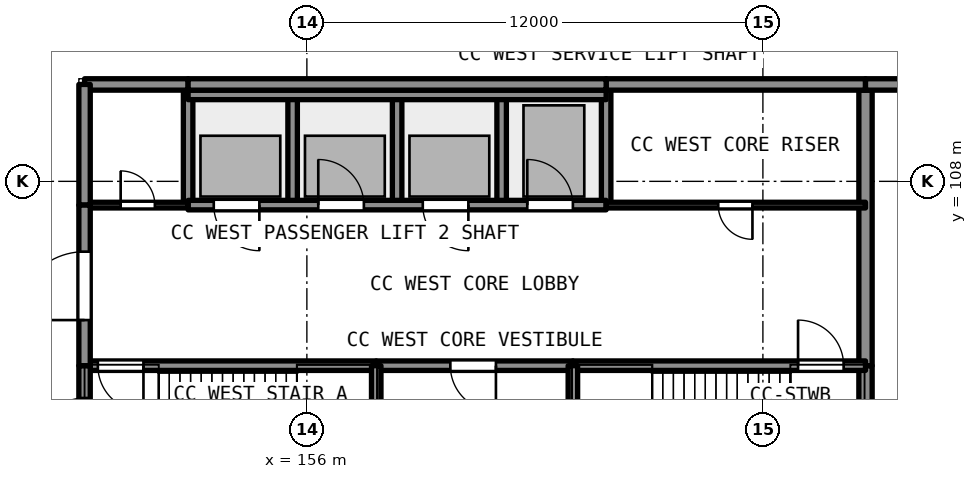
"""IFC4 building model, lengths in metres.
Left out: names, types, materials, properties, quantities, classifications, styles, units other than length and angle.
Written with IfcOpenShell. Run it as: python <this file> out.ifc"""

import sys

from ifc_helpers import new_model, si_unit, direction, frame, frame_2d, origin, place, context, subcontext, project, spatial, rectangle, extrude, element, fill, save


model = new_model("IFC4")
c1 = context("Model", 3, precision=1e-05, world=origin(), true_north=direction((0.0, 1.0)))
c2 = subcontext(c1, "Body", "Model", "MODEL_VIEW")
j1 = project(units=[si_unit("LENGTHUNIT", "METRE"), si_unit("PLANEANGLEUNIT", "RADIAN")], contexts=[c1])
p1 = place(None, origin())
s1 = spatial("IfcSite", under=j1, at=p1, CompositionType="ELEMENT")
p2 = place(p1, origin())
s2 = spatial("IfcBuilding", under=s1, at=p2, CompositionType="ELEMENT")
p3 = place(p2, origin())
s3 = spatial("IfcBuildingStorey", under=s2, at=p3, CompositionType="ELEMENT", Elevation=0.0)
p4 = place(p3, frame((170.7, 100.0, 0.0), z_axis=(0.0, 0.0, 1.0), x_axis=(0.0, 1.0, 0.0)))
e1 = element("IfcWall", 1, at=p4, inside=s3, PredefinedType="SHEAR", context=c2, shape_type="SweptSolid", body=[
    extrude(rectangle(XDim=3.15, YDim=0.35, at=frame_2d((1.575, 0.0))), origin(), (0.0, 0.0, 1.0), 8.59),
])
p5 = place(p3, frame((170.7, 103.15, 0.0), z_axis=(0.0, 0.0, 1.0), x_axis=(0.0, 1.0, 0.0)))
e2 = element("IfcWall", 2, at=p5, inside=s3, PredefinedType="SHEAR", context=c2, shape_type="SweptSolid", body=[
    extrude(rectangle(XDim=7.25, YDim=0.35, at=frame_2d((3.625, 0.0))), origin(), (0.0, 0.0, 1.0), 8.59),
])
p6 = place(p3, frame((150.3, 103.15, 0.0), z_axis=(0.0, 0.0, 1.0), x_axis=(1.0, 0.0, 0.0)))
e3 = element("IfcWall", 3, at=p6, inside=s3, PredefinedType="SHEAR", context=c2, shape_type="SweptSolid", body=[
    extrude(rectangle(XDim=7.525, YDim=0.25, at=frame_2d((3.762, 0.0))), origin(), (0.0, 0.0, 1.0), 8.59),
])
p7 = place(p6, frame((0.2, 0.0, 0.0)))
e4 = element("IfcOpeningElement", 4, at=p7, cuts=e3, PredefinedType="OPENING", context=c2, shape_type="SweptSolid", body=[
    extrude(rectangle(XDim=1.2, YDim=2.1, at=frame_2d((0.6, 1.05))), frame((0.0, 0.135, 0.0), z_axis=(0.0, -1.0, 0.0), x_axis=(1.0, 0.0, 0.0)), (0.0, 0.0, 1.0), 0.271),
])
p8 = place(p3, frame((157.825, 103.15, 0.0), z_axis=(0.0, 0.0, 1.0), x_axis=(1.0, 0.0, 0.0)))
e5 = element("IfcWall", 5, at=p8, inside=s3, PredefinedType="SHEAR", context=c2, shape_type="SweptSolid", body=[
    extrude(rectangle(XDim=5.175, YDim=0.25, at=frame_2d((2.587, 0.0))), origin(), (0.0, 0.0, 1.0), 8.59),
])
p9 = place(p8, frame((1.95, 0.0, 0.0)))
e6 = element("IfcOpeningElement", 6, at=p9, cuts=e5, PredefinedType="OPENING", context=c2, shape_type="SweptSolid", body=[
    extrude(rectangle(XDim=1.2, YDim=2.1, at=frame_2d((0.6, 1.05))), frame((0.0, 0.135, 0.0), z_axis=(0.0, -1.0, 0.0), x_axis=(1.0, 0.0, 0.0)), (0.0, 0.0, 1.0), 0.271),
])
p10 = place(p3, frame((163.0, 103.15, 0.0), z_axis=(0.0, 0.0, 1.0), x_axis=(1.0, 0.0, 0.0)))
e7 = element("IfcWall", 7, at=p10, inside=s3, PredefinedType="SHEAR", context=c2, shape_type="SweptSolid", body=[
    extrude(rectangle(XDim=7.7, YDim=0.25, at=frame_2d((3.85, 0.0))), origin(), (0.0, 0.0, 1.0), 8.59),
])
p11 = place(p10, frame((5.925, 0.0, 0.0)))
e8 = element("IfcOpeningElement", 8, at=p11, cuts=e7, PredefinedType="OPENING", context=c2, shape_type="SweptSolid", body=[
    extrude(rectangle(XDim=1.2, YDim=2.1, at=frame_2d((0.6, 1.05))), frame((0.0, 0.135, 0.0), z_axis=(0.0, -1.0, 0.0), x_axis=(1.0, 0.0, 0.0)), (0.0, 0.0, 1.0), 0.271),
])
for number, where, z_axis, x_axis in (
    (9, (157.825, 100.0, 0.0), (0.0, 0.0, 1.0), (0.0, 1.0, 0.0)),
    (10, (163.0, 100.0, 0.0), (0.0, 0.0, 1.0), (0.0, 1.0, 0.0)),
):
    element("IfcWall", number, at=place(p3, frame(where, z_axis=z_axis, x_axis=x_axis)), inside=s3, PredefinedType="SHEAR", context=c2, shape_type="SweptSolid", body=[
        extrude(rectangle(XDim=3.15, YDim=0.25, at=frame_2d((1.575, 0.0))), origin(), (0.0, 0.0, 1.0), 8.59),
    ])
for number, where, z_axis, x_axis in (
    (11, (152.875, 107.375, -1.2), (0.0, 0.0, 1.0), (0.0, 1.0, 0.0)),
    (12, (155.625, 107.375, -1.2), (0.0, 0.0, 1.0), (0.0, 1.0, 0.0)),
    (13, (158.375, 107.375, -1.2), (0.0, 0.0, 1.0), (0.0, 1.0, 0.0)),
    (14, (161.125, 107.375, -1.2), (0.0, 0.0, 1.0), (0.0, 1.0, 0.0)),
    (15, (163.875, 107.375, -1.2), (0.0, 0.0, 1.0), (0.0, 1.0, 0.0)),
):
    element("IfcWall", number, at=place(p3, frame(where, z_axis=z_axis, x_axis=x_axis)), inside=s3, PredefinedType="SHEAR", context=c2, shape_type="SweptSolid", body=[
        extrude(rectangle(XDim=3.025, YDim=0.25, at=frame_2d((1.512, 0.0))), origin(), (0.0, 0.0, 1.0), 30.79),
    ])
p12 = place(p3, frame((163.875, 107.375, -1.2), z_axis=(0.0, 0.0, 1.0), x_axis=(-1.0, 0.0, 0.0)))
e16 = element("IfcWall", 16, at=p12, inside=s3, PredefinedType="SHEAR", context=c2, shape_type="SweptSolid", body=[
    extrude(rectangle(XDim=11.0, YDim=0.25, at=frame_2d((5.5, 0.0))), origin(), (0.0, 0.0, 1.0), 30.79),
])
p13 = place(p12, frame((9.125, 0.0, 1.2)))
e17 = element("IfcOpeningElement", 17, at=p13, cuts=e16, PredefinedType="OPENING", context=c2, shape_type="SweptSolid", body=[
    extrude(rectangle(XDim=1.2, YDim=2.1, at=frame_2d((0.6, 1.05))), frame((0.0, 0.135, 0.0), z_axis=(0.0, -1.0, 0.0), x_axis=(1.0, 0.0, 0.0)), (0.0, 0.0, 1.0), 0.271),
])
p14 = place(p12, frame((6.375, 0.0, 1.2)))
e18 = element("IfcOpeningElement", 18, at=p14, cuts=e16, PredefinedType="OPENING", context=c2, shape_type="SweptSolid", body=[
    extrude(rectangle(XDim=1.2, YDim=2.1, at=frame_2d((0.6, 1.05))), frame((0.0, 0.135, 0.0), z_axis=(0.0, -1.0, 0.0), x_axis=(1.0, 0.0, 0.0)), (0.0, 0.0, 1.0), 0.271),
])
p15 = place(p12, frame((3.625, 0.0, 1.2)))
e19 = element("IfcOpeningElement", 19, at=p15, cuts=e16, PredefinedType="OPENING", context=c2, shape_type="SweptSolid", body=[
    extrude(rectangle(XDim=1.2, YDim=2.1, at=frame_2d((0.6, 1.05))), frame((0.0, 0.135, 0.0), z_axis=(0.0, -1.0, 0.0), x_axis=(1.0, 0.0, 0.0)), (0.0, 0.0, 1.0), 0.271),
])
p16 = place(p12, frame((0.875, 0.0, 1.2)))
e20 = element("IfcOpeningElement", 20, at=p16, cuts=e16, PredefinedType="OPENING", context=c2, shape_type="SweptSolid", body=[
    extrude(rectangle(XDim=1.2, YDim=2.1, at=frame_2d((0.6, 1.05))), frame((0.0, 0.135, 0.0), z_axis=(0.0, -1.0, 0.0), x_axis=(1.0, 0.0, 0.0)), (0.0, 0.0, 1.0), 0.271),
])
p17 = place(p12, frame((9.125, 0.0, 10.2)))
e21 = element("IfcOpeningElement", 21, at=p17, cuts=e16, PredefinedType="OPENING", context=c2, shape_type="SweptSolid", body=[
    extrude(rectangle(XDim=1.2, YDim=2.1, at=frame_2d((0.6, 1.05))), frame((0.0, 0.135, 0.0), z_axis=(0.0, -1.0, 0.0), x_axis=(1.0, 0.0, 0.0)), (0.0, 0.0, 1.0), 0.271),
])
p18 = place(p12, frame((6.375, 0.0, 10.2)))
e22 = element("IfcOpeningElement", 22, at=p18, cuts=e16, PredefinedType="OPENING", context=c2, shape_type="SweptSolid", body=[
    extrude(rectangle(XDim=1.2, YDim=2.1, at=frame_2d((0.6, 1.05))), frame((0.0, 0.135, 0.0), z_axis=(0.0, -1.0, 0.0), x_axis=(1.0, 0.0, 0.0)), (0.0, 0.0, 1.0), 0.271),
])
p19 = place(p12, frame((3.625, 0.0, 10.2)))
e23 = element("IfcOpeningElement", 23, at=p19, cuts=e16, PredefinedType="OPENING", context=c2, shape_type="SweptSolid", body=[
    extrude(rectangle(XDim=1.2, YDim=2.1, at=frame_2d((0.6, 1.05))), frame((0.0, 0.135, 0.0), z_axis=(0.0, -1.0, 0.0), x_axis=(1.0, 0.0, 0.0)), (0.0, 0.0, 1.0), 0.271),
])
p20 = place(p12, frame((0.875, 0.0, 10.2)))
e24 = element("IfcOpeningElement", 24, at=p20, cuts=e16, PredefinedType="OPENING", context=c2, shape_type="SweptSolid", body=[
    extrude(rectangle(XDim=1.2, YDim=2.1, at=frame_2d((0.6, 1.05))), frame((0.0, 0.135, 0.0), z_axis=(0.0, -1.0, 0.0), x_axis=(1.0, 0.0, 0.0)), (0.0, 0.0, 1.0), 0.271),
])
p21 = place(p12, frame((9.125, 0.0, 16.2)))
e25 = element("IfcOpeningElement", 25, at=p21, cuts=e16, PredefinedType="OPENING", context=c2, shape_type="SweptSolid", body=[
    extrude(rectangle(XDim=1.2, YDim=2.1, at=frame_2d((0.6, 1.05))), frame((0.0, 0.135, 0.0), z_axis=(0.0, -1.0, 0.0), x_axis=(1.0, 0.0, 0.0)), (0.0, 0.0, 1.0), 0.271),
])
p22 = place(p12, frame((6.375, 0.0, 16.2)))
e26 = element("IfcOpeningElement", 26, at=p22, cuts=e16, PredefinedType="OPENING", context=c2, shape_type="SweptSolid", body=[
    extrude(rectangle(XDim=1.2, YDim=2.1, at=frame_2d((0.6, 1.05))), frame((0.0, 0.135, 0.0), z_axis=(0.0, -1.0, 0.0), x_axis=(1.0, 0.0, 0.0)), (0.0, 0.0, 1.0), 0.271),
])
p23 = place(p12, frame((3.625, 0.0, 16.2)))
e27 = element("IfcOpeningElement", 27, at=p23, cuts=e16, PredefinedType="OPENING", context=c2, shape_type="SweptSolid", body=[
    extrude(rectangle(XDim=1.2, YDim=2.1, at=frame_2d((0.6, 1.05))), frame((0.0, 0.135, 0.0), z_axis=(0.0, -1.0, 0.0), x_axis=(1.0, 0.0, 0.0)), (0.0, 0.0, 1.0), 0.271),
])
p24 = place(p12, frame((0.875, 0.0, 16.2)))
e28 = element("IfcOpeningElement", 28, at=p24, cuts=e16, PredefinedType="OPENING", context=c2, shape_type="SweptSolid", body=[
    extrude(rectangle(XDim=1.2, YDim=2.1, at=frame_2d((0.6, 1.05))), frame((0.0, 0.135, 0.0), z_axis=(0.0, -1.0, 0.0), x_axis=(1.0, 0.0, 0.0)), (0.0, 0.0, 1.0), 0.271),
])
p25 = place(p12, frame((9.125, 0.0, 21.6)))
e29 = element("IfcOpeningElement", 29, at=p25, cuts=e16, PredefinedType="OPENING", context=c2, shape_type="SweptSolid", body=[
    extrude(rectangle(XDim=1.2, YDim=2.1, at=frame_2d((0.6, 1.05))), frame((0.0, 0.135, 0.0), z_axis=(0.0, -1.0, 0.0), x_axis=(1.0, 0.0, 0.0)), (0.0, 0.0, 1.0), 0.271),
])
p26 = place(p12, frame((6.375, 0.0, 21.6)))
e30 = element("IfcOpeningElement", 30, at=p26, cuts=e16, PredefinedType="OPENING", context=c2, shape_type="SweptSolid", body=[
    extrude(rectangle(XDim=1.2, YDim=2.1, at=frame_2d((0.6, 1.05))), frame((0.0, 0.135, 0.0), z_axis=(0.0, -1.0, 0.0), x_axis=(1.0, 0.0, 0.0)), (0.0, 0.0, 1.0), 0.271),
])
p27 = place(p12, frame((3.625, 0.0, 21.6)))
e31 = element("IfcOpeningElement", 31, at=p27, cuts=e16, PredefinedType="OPENING", context=c2, shape_type="SweptSolid", body=[
    extrude(rectangle(XDim=1.2, YDim=2.1, at=frame_2d((0.6, 1.05))), frame((0.0, 0.135, 0.0), z_axis=(0.0, -1.0, 0.0), x_axis=(1.0, 0.0, 0.0)), (0.0, 0.0, 1.0), 0.271),
])
p28 = place(p12, frame((0.875, 0.0, 21.6)))
e32 = element("IfcOpeningElement", 32, at=p28, cuts=e16, PredefinedType="OPENING", context=c2, shape_type="SweptSolid", body=[
    extrude(rectangle(XDim=1.2, YDim=2.1, at=frame_2d((0.6, 1.05))), frame((0.0, 0.135, 0.0), z_axis=(0.0, -1.0, 0.0), x_axis=(1.0, 0.0, 0.0)), (0.0, 0.0, 1.0), 0.271),
])
p29 = place(p12, frame((9.125, 0.0, 26.6)))
e33 = element("IfcOpeningElement", 33, at=p29, cuts=e16, PredefinedType="OPENING", context=c2, shape_type="SweptSolid", body=[
    extrude(rectangle(XDim=1.2, YDim=2.1, at=frame_2d((0.6, 1.05))), frame((0.0, 0.135, 0.0), z_axis=(0.0, -1.0, 0.0), x_axis=(1.0, 0.0, 0.0)), (0.0, 0.0, 1.0), 0.271),
])
p30 = place(p12, frame((6.375, 0.0, 26.6)))
e34 = element("IfcOpeningElement", 34, at=p30, cuts=e16, PredefinedType="OPENING", context=c2, shape_type="SweptSolid", body=[
    extrude(rectangle(XDim=1.2, YDim=2.1, at=frame_2d((0.6, 1.05))), frame((0.0, 0.135, 0.0), z_axis=(0.0, -1.0, 0.0), x_axis=(1.0, 0.0, 0.0)), (0.0, 0.0, 1.0), 0.271),
])
p31 = place(p12, frame((3.625, 0.0, 26.6)))
e35 = element("IfcOpeningElement", 35, at=p31, cuts=e16, PredefinedType="OPENING", context=c2, shape_type="SweptSolid", body=[
    extrude(rectangle(XDim=1.2, YDim=2.1, at=frame_2d((0.6, 1.05))), frame((0.0, 0.135, 0.0), z_axis=(0.0, -1.0, 0.0), x_axis=(1.0, 0.0, 0.0)), (0.0, 0.0, 1.0), 0.271),
])
p32 = place(p12, frame((0.875, 0.0, 26.6)))
e36 = element("IfcOpeningElement", 36, at=p32, cuts=e16, PredefinedType="OPENING", context=c2, shape_type="SweptSolid", body=[
    extrude(rectangle(XDim=1.2, YDim=2.1, at=frame_2d((0.6, 1.05))), frame((0.0, 0.135, 0.0), z_axis=(0.0, -1.0, 0.0), x_axis=(1.0, 0.0, 0.0)), (0.0, 0.0, 1.0), 0.271),
])
p33 = place(p3, frame((152.875, 110.275, -1.2), z_axis=(0.0, 0.0, 1.0), x_axis=(1.0, 0.0, 0.0)))
e37 = element("IfcWall", 37, at=p33, inside=s3, PredefinedType="SHEAR", context=c2, shape_type="SweptSolid", body=[
    extrude(rectangle(XDim=11.0, YDim=0.25, at=frame_2d((5.5, 0.0))), origin(), (0.0, 0.0, 1.0), 30.79),
])
p34 = place(p3, frame((150.3, 107.375, 0.0), z_axis=(0.0, 0.0, 1.0), x_axis=(1.0, 0.0, 0.0)))
e38 = element("IfcWall", 38, at=p34, inside=s3, PredefinedType="PARTITIONING", context=c2, shape_type="SweptSolid", body=[
    extrude(rectangle(XDim=2.575, YDim=0.15, at=frame_2d((1.288, 0.0))), origin(), (0.0, 0.0, 1.0), 8.59),
])
p35 = place(p34, frame((0.8, 0.0, 0.0)))
e39 = element("IfcOpeningElement", 39, at=p35, cuts=e38, PredefinedType="OPENING", context=c2, shape_type="SweptSolid", body=[
    extrude(rectangle(XDim=0.9, YDim=2.1, at=frame_2d((0.45, 1.05))), frame((0.0, 0.085, 0.0), z_axis=(0.0, -1.0, 0.0), x_axis=(1.0, 0.0, 0.0)), (0.0, 0.0, 1.0), 0.171),
])
p36 = place(p3, frame((150.15, 110.55, 0.0), z_axis=(0.0, 0.0, 1.0), x_axis=(1.0, 0.0, 0.0)))
e40 = element("IfcWall", 40, at=p36, inside=s3, PredefinedType="SOLIDWALL", context=c2, shape_type="SweptSolid", body=[
    extrude(rectangle(XDim=2.725, YDim=0.3, at=frame_2d((1.363, 0.0))), origin(), (0.0, 0.0, 1.0), 8.59),
])
p37 = place(p3, frame((150.15, 107.375, 0.0), z_axis=(0.0, 0.0, 1.0), x_axis=(0.0, 1.0, 0.0)))
e41 = element("IfcWall", 41, at=p37, inside=s3, PredefinedType="SOLIDWALL", context=c2, shape_type="SweptSolid", body=[
    extrude(rectangle(XDim=3.175, YDim=0.3, at=frame_2d((1.587, 0.0))), origin(), (0.0, 0.0, 1.0), 8.59),
])
p38 = place(p3, frame((163.875, 107.375, 0.0), z_axis=(0.0, 0.0, 1.0), x_axis=(1.0, 0.0, 0.0)))
e42 = element("IfcWall", 42, at=p38, inside=s3, PredefinedType="PARTITIONING", context=c2, shape_type="SweptSolid", body=[
    extrude(rectangle(XDim=6.825, YDim=0.15, at=frame_2d((3.413, 0.0))), origin(), (0.0, 0.0, 1.0), 8.59),
])
p39 = place(p38, frame((2.95, 0.0, 0.0)))
e43 = element("IfcOpeningElement", 43, at=p39, cuts=e42, PredefinedType="OPENING", context=c2, shape_type="SweptSolid", body=[
    extrude(rectangle(XDim=0.9, YDim=2.1, at=frame_2d((0.45, 1.05))), frame((0.0, 0.085, 0.0), z_axis=(0.0, -1.0, 0.0), x_axis=(1.0, 0.0, 0.0)), (0.0, 0.0, 1.0), 0.171),
])
p40 = place(p3, frame((163.875, 110.55, 0.0), z_axis=(0.0, 0.0, 1.0), x_axis=(1.0, 0.0, 0.0)))
e44 = element("IfcWall", 44, at=p40, inside=s3, PredefinedType="SOLIDWALL", context=c2, shape_type="SweptSolid", body=[
    extrude(rectangle(XDim=6.825, YDim=0.3, at=frame_2d((3.413, 0.0))), origin(), (0.0, 0.0, 1.0), 8.59),
])
p41 = place(p3, frame((150.15, 100.0, 0.0), z_axis=(0.0, 0.0, 1.0), x_axis=(0.0, 1.0, 0.0)))
e45 = element("IfcWall", 45, at=p41, inside=s3, PredefinedType="SOLIDWALL", context=c2, shape_type="SweptSolid", body=[
    extrude(rectangle(XDim=3.15, YDim=0.3, at=frame_2d((1.575, 0.0))), origin(), (0.0, 0.0, 1.0), 8.59),
])
p42 = place(p41, frame((1.1, 0.0, 0.0)))
e46 = element("IfcOpeningElement", 46, at=p42, cuts=e45, PredefinedType="OPENING", context=c2, shape_type="SweptSolid", body=[
    extrude(rectangle(XDim=1.2, YDim=2.1, at=frame_2d((0.6, 1.05))), frame((0.0, 0.161, 0.0), z_axis=(0.0, -1.0, 0.0), x_axis=(1.0, 0.0, 0.0)), (0.0, 0.0, 1.0), 0.321),
])
p43 = place(p3, frame((150.15, 103.15, 0.0), z_axis=(0.0, 0.0, 1.0), x_axis=(0.0, 1.0, 0.0)))
e47 = element("IfcWall", 47, at=p43, inside=s3, PredefinedType="SOLIDWALL", context=c2, shape_type="SweptSolid", body=[
    extrude(rectangle(XDim=4.225, YDim=0.3, at=frame_2d((2.113, 0.0))), origin(), (0.0, 0.0, 1.0), 8.59),
])
p44 = place(p43, frame((1.2, 0.0, 0.0)))
e48 = element("IfcOpeningElement", 48, at=p44, cuts=e47, PredefinedType="OPENING", context=c2, shape_type="SweptSolid", body=[
    extrude(rectangle(XDim=1.8, YDim=2.1, at=frame_2d((0.9, 1.05))), frame((0.0, 0.161, 0.0), z_axis=(0.0, -1.0, 0.0), x_axis=(1.0, 0.0, 0.0)), (0.0, 0.0, 1.0), 0.321),
])
p45 = place(p3, frame((152.875, 110.55, 0.0), z_axis=(0.0, 0.0, 1.0), x_axis=(1.0, 0.0, 0.0)))
e49 = element("IfcWall", 49, at=p45, inside=s3, PredefinedType="SOLIDWALL", context=c2, shape_type="SweptSolid", body=[
    extrude(rectangle(XDim=11.0, YDim=0.3, at=frame_2d((5.5, 0.0))), origin(), (0.0, 0.0, 1.0), 8.59),
])
p46 = place(p3, frame((170.7, 110.55, 0.0), z_axis=(0.0, 0.0, 1.0), x_axis=(1.0, 0.0, 0.0)))
e50 = element("IfcWall", 50, at=p46, inside=s3, PredefinedType="SOLIDWALL", context=c2, shape_type="SweptSolid", body=[
    extrude(rectangle(XDim=80.55, YDim=0.3, at=frame_2d((40.275, 0.0))), origin(), (0.0, 0.0, 1.0), 8.59),
])
p47 = place(p46, frame((1.6, 0.0, 0.0)))
e51 = element("IfcOpeningElement", 51, at=p47, cuts=e50, PredefinedType="OPENING", context=c2, shape_type="SweptSolid", body=[
    extrude(rectangle(XDim=4.0, YDim=4.2, at=frame_2d((2.0, 2.1))), frame((0.0, 0.161, 0.0), z_axis=(0.0, -1.0, 0.0), x_axis=(1.0, 0.0, 0.0)), (0.0, 0.0, 1.0), 0.321),
])
p48 = place(p46, frame((11.6, 0.0, 0.0)))
e52 = element("IfcOpeningElement", 52, at=p48, cuts=e50, PredefinedType="OPENING", context=c2, shape_type="SweptSolid", body=[
    extrude(rectangle(XDim=4.0, YDim=4.2, at=frame_2d((2.0, 2.1))), frame((0.0, 0.161, 0.0), z_axis=(0.0, -1.0, 0.0), x_axis=(1.0, 0.0, 0.0)), (0.0, 0.0, 1.0), 0.321),
])
p49 = place(p46, frame((21.6, 0.0, 0.0)))
e53 = element("IfcOpeningElement", 53, at=p49, cuts=e50, PredefinedType="OPENING", context=c2, shape_type="SweptSolid", body=[
    extrude(rectangle(XDim=4.0, YDim=4.2, at=frame_2d((2.0, 2.1))), frame((0.0, 0.161, 0.0), z_axis=(0.0, -1.0, 0.0), x_axis=(1.0, 0.0, 0.0)), (0.0, 0.0, 1.0), 0.321),
])
p50 = place(p46, frame((31.6, 0.0, 0.0)))
e54 = element("IfcOpeningElement", 54, at=p50, cuts=e50, PredefinedType="OPENING", context=c2, shape_type="SweptSolid", body=[
    extrude(rectangle(XDim=4.0, YDim=4.2, at=frame_2d((2.0, 2.1))), frame((0.0, 0.161, 0.0), z_axis=(0.0, -1.0, 0.0), x_axis=(1.0, 0.0, 0.0)), (0.0, 0.0, 1.0), 0.321),
])
p51 = place(p46, frame((16.35, 0.0, 0.0)))
e55 = element("IfcOpeningElement", 55, at=p51, cuts=e50, PredefinedType="OPENING", context=c2, shape_type="SweptSolid", body=[
    extrude(rectangle(XDim=2.4, YDim=2.1, at=frame_2d((1.2, 1.05))), frame((0.0, 0.161, 0.0), z_axis=(0.0, -1.0, 0.0), x_axis=(1.0, 0.0, 0.0)), (0.0, 0.0, 1.0), 0.321),
])
p52 = place(p46, frame((26.35, 0.0, 0.0)))
e56 = element("IfcOpeningElement", 56, at=p52, cuts=e50, PredefinedType="OPENING", context=c2, shape_type="SweptSolid", body=[
    extrude(rectangle(XDim=2.4, YDim=2.1, at=frame_2d((1.2, 1.05))), frame((0.0, 0.161, 0.0), z_axis=(0.0, -1.0, 0.0), x_axis=(1.0, 0.0, 0.0)), (0.0, 0.0, 1.0), 0.321),
])
p53 = place(p46, frame((36.35, 0.0, 0.0)))
e57 = element("IfcOpeningElement", 57, at=p53, cuts=e50, PredefinedType="OPENING", context=c2, shape_type="SweptSolid", body=[
    extrude(rectangle(XDim=2.4, YDim=2.1, at=frame_2d((1.2, 1.05))), frame((0.0, 0.161, 0.0), z_axis=(0.0, -1.0, 0.0), x_axis=(1.0, 0.0, 0.0)), (0.0, 0.0, 1.0), 0.321),
])
p54 = place(p7, origin())
e58 = element("IfcDoor", 58, at=p54, inside=s3, OperationType="SINGLE_SWING_RIGHT", PredefinedType="DOOR", context=c2, shape_type="SweptSolid", body=[
    extrude(rectangle(XDim=1.2, YDim=2.1, at=frame_2d((0.6, 1.05))), frame((0.0, 0.025, 0.0), z_axis=(0.0, -1.0, 0.0), x_axis=(1.0, 0.0, 0.0)), (0.0, 0.0, 1.0), 0.05),
])
fill(e4, e58)
p55 = place(p11, origin())
e59 = element("IfcDoor", 59, at=p55, inside=s3, OperationType="SINGLE_SWING_LEFT", PredefinedType="DOOR", context=c2, shape_type="SweptSolid", body=[
    extrude(rectangle(XDim=1.2, YDim=2.1, at=frame_2d((0.6, 1.05))), frame((0.0, 0.025, 0.0), z_axis=(0.0, -1.0, 0.0), x_axis=(1.0, 0.0, 0.0)), (0.0, 0.0, 1.0), 0.05),
])
fill(e8, e59)
p56 = place(p9, origin())
e60 = element("IfcDoor", 60, at=p56, inside=s3, OperationType="SINGLE_SWING_RIGHT", PredefinedType="DOOR", context=c2, shape_type="SweptSolid", body=[
    extrude(rectangle(XDim=1.2, YDim=2.1, at=frame_2d((0.6, 1.05))), frame((0.0, 0.025, 0.0), z_axis=(0.0, -1.0, 0.0), x_axis=(1.0, 0.0, 0.0)), (0.0, 0.0, 1.0), 0.05),
])
fill(e6, e60)
p57 = place(p13, origin())
e61 = element("IfcDoor", 61, at=p57, inside=s3, OperationType="SLIDING_TO_LEFT", PredefinedType="DOOR", context=c2, shape_type="SweptSolid", body=[
    extrude(rectangle(XDim=1.2, YDim=2.1, at=frame_2d((0.6, 1.05))), frame((0.0, 0.025, 0.0), z_axis=(0.0, -1.0, 0.0), x_axis=(1.0, 0.0, 0.0)), (0.0, 0.0, 1.0), 0.05),
])
fill(e17, e61)
p58 = place(p14, origin())
e62 = element("IfcDoor", 62, at=p58, inside=s3, OperationType="SLIDING_TO_RIGHT", PredefinedType="DOOR", context=c2, shape_type="SweptSolid", body=[
    extrude(rectangle(XDim=1.2, YDim=2.1, at=frame_2d((0.6, 1.05))), frame((0.0, 0.025, 0.0), z_axis=(0.0, -1.0, 0.0), x_axis=(1.0, 0.0, 0.0)), (0.0, 0.0, 1.0), 0.05),
])
fill(e18, e62)
p59 = place(p15, origin())
e63 = element("IfcDoor", 63, at=p59, inside=s3, OperationType="SLIDING_TO_LEFT", PredefinedType="DOOR", context=c2, shape_type="SweptSolid", body=[
    extrude(rectangle(XDim=1.2, YDim=2.1, at=frame_2d((0.6, 1.05))), frame((0.0, 0.025, 0.0), z_axis=(0.0, -1.0, 0.0), x_axis=(1.0, 0.0, 0.0)), (0.0, 0.0, 1.0), 0.05),
])
fill(e19, e63)
p60 = place(p16, origin())
e64 = element("IfcDoor", 64, at=p60, inside=s3, OperationType="SLIDING_TO_RIGHT", PredefinedType="DOOR", context=c2, shape_type="SweptSolid", body=[
    extrude(rectangle(XDim=1.2, YDim=2.1, at=frame_2d((0.6, 1.05))), frame((0.0, 0.025, 0.0), z_axis=(0.0, -1.0, 0.0), x_axis=(1.0, 0.0, 0.0)), (0.0, 0.0, 1.0), 0.05),
])
fill(e20, e64)
p61 = place(p35, origin())
e65 = element("IfcDoor", 65, at=p61, inside=s3, OperationType="SINGLE_SWING_LEFT", PredefinedType="DOOR", context=c2, shape_type="SweptSolid", body=[
    extrude(rectangle(XDim=0.9, YDim=2.1, at=frame_2d((0.45, 1.05))), frame((0.0, 0.025, 0.0), z_axis=(0.0, -1.0, 0.0), x_axis=(1.0, 0.0, 0.0)), (0.0, 0.0, 1.0), 0.05),
])
fill(e39, e65)
p62 = place(p39, origin())
e66 = element("IfcDoor", 66, at=p62, inside=s3, OperationType="SINGLE_SWING_RIGHT", PredefinedType="DOOR", context=c2, shape_type="SweptSolid", body=[
    extrude(rectangle(XDim=0.9, YDim=2.1, at=frame_2d((0.45, 1.05))), frame((0.0, 0.025, 0.0), z_axis=(0.0, -1.0, 0.0), x_axis=(1.0, 0.0, 0.0)), (0.0, 0.0, 1.0), 0.05),
])
fill(e43, e66)
p63 = place(p42, origin())
e67 = element("IfcDoor", 67, at=p63, inside=s3, OperationType="SINGLE_SWING_LEFT", PredefinedType="DOOR", context=c2, shape_type="SweptSolid", body=[
    extrude(rectangle(XDim=1.2, YDim=2.1, at=frame_2d((0.6, 1.05))), frame((0.0, 0.025, 0.0), z_axis=(0.0, -1.0, 0.0), x_axis=(1.0, 0.0, 0.0)), (0.0, 0.0, 1.0), 0.05),
])
fill(e46, e67)
p64 = place(p44, origin())
e68 = element("IfcDoor", 68, at=p64, inside=s3, OperationType="DOUBLE_DOOR_SINGLE_SWING", PredefinedType="DOOR", context=c2, shape_type="SweptSolid", body=[
    extrude(rectangle(XDim=1.8, YDim=2.1, at=frame_2d((0.9, 1.05))), frame((0.0, 0.025, 0.0), z_axis=(0.0, -1.0, 0.0), x_axis=(1.0, 0.0, 0.0)), (0.0, 0.0, 1.0), 0.05),
])
fill(e48, e68)
save(model, sys.argv[1])
